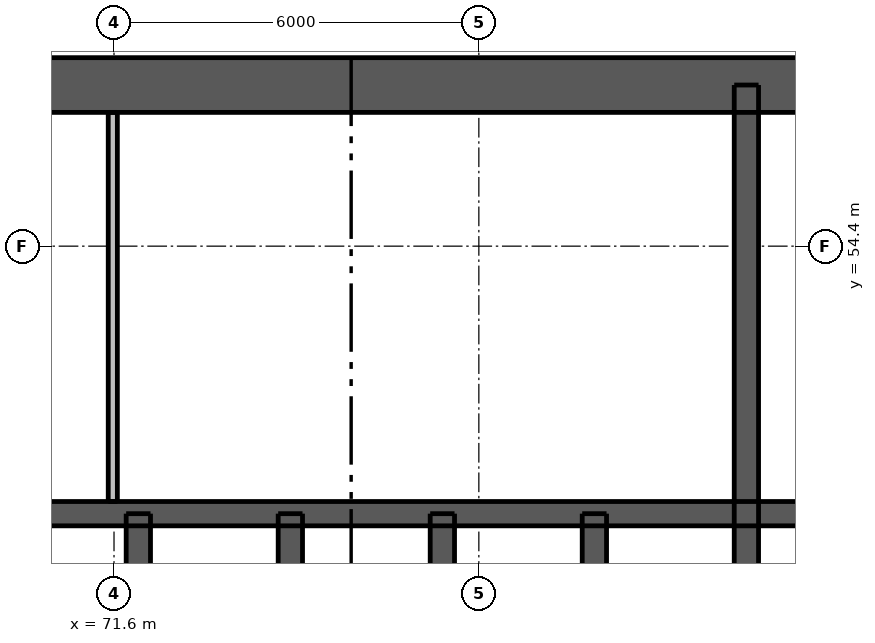
"""IFC4 building model, lengths in metres.
Left out: names, types, materials, properties, quantities, classifications, styles, units other than length and angle.
Written with IfcOpenShell. Run it as: python <this file> out.ifc"""

import sys

from ifc_helpers import new_model, si_unit, direction, frame, frame_2d, origin, place, context, subcontext, project, spatial, rectangle, extrude, element, fill, save


model = new_model("IFC4")
c1 = context("Model", 3, precision=1e-05, world=origin(), true_north=direction((0.0, 1.0)))
c2 = subcontext(c1, "Body", "Model", "MODEL_VIEW")
j1 = project(units=[si_unit("LENGTHUNIT", "METRE"), si_unit("PLANEANGLEUNIT", "RADIAN")], contexts=[c1])
p1 = place(None, origin())
s1 = spatial("IfcSite", under=j1, at=p1, CompositionType="ELEMENT")
p2 = place(p1, origin())
s2 = spatial("IfcBuilding", under=s1, at=p2, CompositionType="ELEMENT")
p3 = place(p2, frame((0.0, 0.0, 26.8)))
s3 = spatial("IfcBuildingStorey", under=s2, at=p3, CompositionType="ELEMENT", Elevation=26.8)
p4 = place(p3, frame((62.5, 57.05, 0.0), z_axis=(0.0, 0.0, 1.0), x_axis=(1.0, 0.0, 0.0)))
e1 = element("IfcWall", 1, at=p4, inside=s3, PredefinedType="SHEAR", context=c2, shape_type="SweptSolid", body=[
    extrude(rectangle(XDim=24.0, YDim=0.9, at=frame_2d((12.0, 0.0))), origin(), (0.0, 0.0, 1.0), 3.05),
])
p5 = place(p4, frame((20.85, 0.0, 0.0)))
e2 = element("IfcOpeningElement", 2, at=p5, cuts=e1, PredefinedType="OPENING", context=c2, shape_type="SweptSolid", body=[
    extrude(rectangle(XDim=1.1, YDim=2.1, at=frame_2d((0.55, 1.05))), frame((0.0, 0.46, 0.0), z_axis=(0.0, -1.0, 0.0), x_axis=(1.0, 0.0, 0.0)), (0.0, 0.0, 1.0), 0.92),
])
p6 = place(p4, frame((2.05, 0.0, 0.0)))
e3 = element("IfcOpeningElement", 3, at=p6, cuts=e1, PredefinedType="OPENING", context=c2, shape_type="SweptSolid", body=[
    extrude(rectangle(XDim=1.1, YDim=2.1, at=frame_2d((0.55, 1.05))), frame((0.0, 0.46, 0.0), z_axis=(0.0, -1.0, 0.0), x_axis=(1.0, 0.0, 0.0)), (0.0, 0.0, 1.0), 0.92),
])
p7 = place(p4, frame((6.44, 0.0, 0.0)))
e4 = element("IfcOpeningElement", 4, at=p7, cuts=e1, PredefinedType="OPENING", context=c2, shape_type="SweptSolid", body=[
    extrude(rectangle(XDim=0.9, YDim=2.1, at=frame_2d((0.45, 1.05))), frame((0.0, 0.46, 0.0), z_axis=(0.0, -1.0, 0.0), x_axis=(1.0, 0.0, 0.0)), (0.0, 0.0, 1.0), 0.92),
])
p8 = place(p4, frame((13.74, 0.0, 0.0)))
e5 = element("IfcOpeningElement", 5, at=p8, cuts=e1, PredefinedType="OPENING", context=c2, shape_type="SweptSolid", body=[
    extrude(rectangle(XDim=0.9, YDim=2.1, at=frame_2d((0.45, 1.05))), frame((0.0, 0.46, 0.0), z_axis=(0.0, -1.0, 0.0), x_axis=(1.0, 0.0, 0.0)), (0.0, 0.0, 1.0), 0.92),
])
p9 = place(p3, frame((62.95, 50.0, 0.0), z_axis=(0.0, 0.0, 1.0), x_axis=(1.0, 0.0, 0.0)))
e6 = element("IfcWall", 6, at=p9, inside=s3, PredefinedType="SHEAR", context=c2, shape_type="SweptSolid", body=[
    extrude(rectangle(XDim=23.1, YDim=0.4, at=frame_2d((11.55, 0.0))), origin(), (0.0, 0.0, 1.0), 3.05),
])
p10 = place(p3, frame((82.0, 47.1, 0.0), z_axis=(0.0, 0.0, 1.0), x_axis=(0.0, 1.0, 0.0)))
e7 = element("IfcWall", 7, at=p10, inside=s3, PredefinedType="SHEAR", context=c2, shape_type="SweptSolid", body=[
    extrude(rectangle(XDim=9.95, YDim=0.4, at=frame_2d((4.975, 0.0))), origin(), (0.0, 0.0, 1.0), 3.05),
])
for number, where, z_axis, x_axis in (
    (8, (72.0, 47.1, 0.0), (0.0, 0.0, 1.0), (0.0, 1.0, 0.0)),
    (9, (74.5, 47.1, 0.0), (0.0, 0.0, 1.0), (0.0, 1.0, 0.0)),
    (10, (77.0, 47.1, 0.0), (0.0, 0.0, 1.0), (0.0, 1.0, 0.0)),
    (11, (79.5, 47.1, 0.0), (0.0, 0.0, 1.0), (0.0, 1.0, 0.0)),
):
    element("IfcWall", number, at=place(p3, frame(where, z_axis=z_axis, x_axis=x_axis)), inside=s3, PredefinedType="SHEAR", context=c2, shape_type="SweptSolid", body=[
        extrude(rectangle(XDim=2.9, YDim=0.4, at=frame_2d((1.45, 0.0))), origin(), (0.0, 0.0, 1.0), 3.05),
    ])
p11 = place(p3, frame((71.58, 50.2, 0.0), z_axis=(0.0, 0.0, 1.0), x_axis=(0.0, 1.0, 0.0)))
e12 = element("IfcWall", 12, at=p11, inside=s3, PredefinedType="PLUMBINGWALL", context=c2, shape_type="SweptSolid", body=[
    extrude(rectangle(XDim=6.4, YDim=0.15, at=frame_2d((3.2, 0.0))), origin(), (0.0, 0.0, 1.0), 3.05),
])
p12 = place(p8, origin())
e13 = element("IfcDoor", 13, at=p12, inside=s3, OperationType="SINGLE_SWING_RIGHT", PredefinedType="DOOR", context=c2, shape_type="SweptSolid", body=[
    extrude(rectangle(XDim=0.9, YDim=2.1, at=frame_2d((0.45, 1.05))), frame((0.0, -0.388, 0.0), z_axis=(0.0, -1.0, 0.0), x_axis=(1.0, 0.0, 0.0)), (0.0, 0.0, 1.0), 0.05),
])
fill(e5, e13)
save(model, sys.argv[1])
